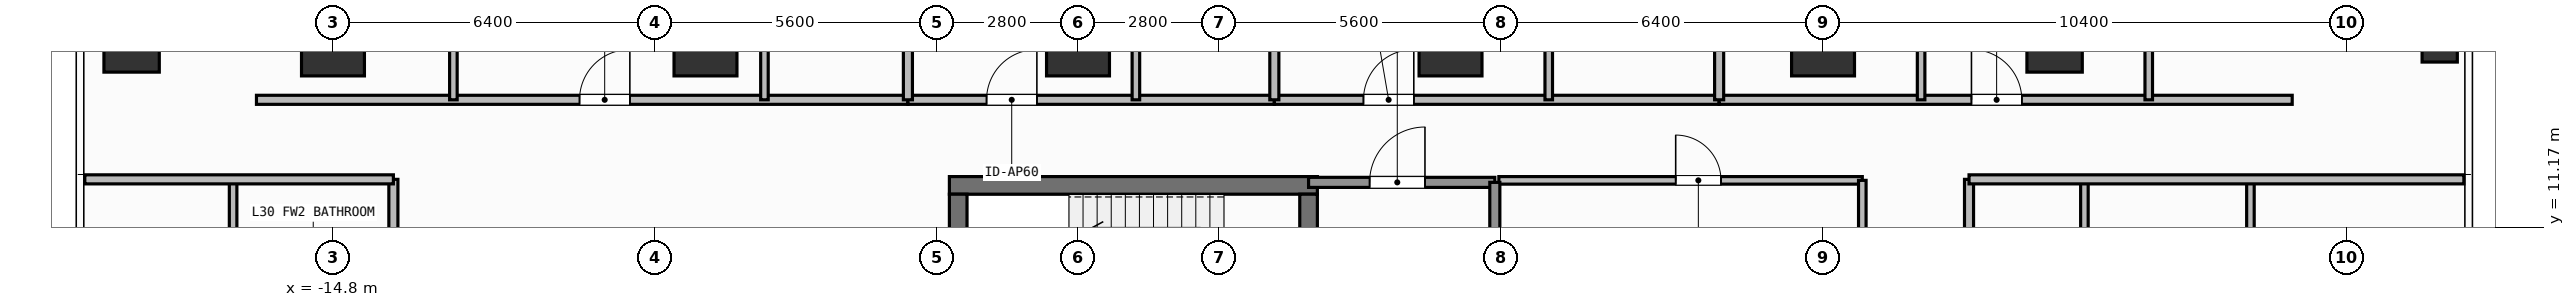
"""IFC4 building model, lengths in metres.
Left out: names, types, materials, properties, quantities, classifications, styles, units other than length and angle.
Written with IfcOpenShell. Run it as: python <this file> out.ifc"""

import sys

from ifc_helpers import new_model, si_unit, direction, frame, frame_2d, origin, origin_2d, place, context, subcontext, project, spatial, rectangle, hollow_rectangle, extrude, element, fill, save


model = new_model("IFC4")
c1 = context("Model", 3, precision=1e-05, world=origin(), true_north=direction((0.0, 1.0)))
c2 = subcontext(c1, "Body", "Model", "MODEL_VIEW")
j1 = project(units=[si_unit("LENGTHUNIT", "METRE"), si_unit("PLANEANGLEUNIT", "RADIAN")], contexts=[c1])
p1 = place(None, origin())
s1 = spatial("IfcSite", under=j1, at=p1, CompositionType="ELEMENT")
p2 = place(p1, origin())
s2 = spatial("IfcBuilding", under=s1, at=p2, CompositionType="ELEMENT")
p3 = place(p2, frame((0.0, 0.0, 121.2)))
s3 = spatial("IfcBuildingStorey", under=s2, at=p3, CompositionType="ELEMENT", Elevation=121.2)
p4 = place(p3, frame((-2.555, 12.0, 0.0), z_axis=(0.0, 0.0, 1.0), x_axis=(1.0, 0.0, 0.0)))
e1 = element("IfcWall", 1, at=p4, inside=s3, PredefinedType="SHEAR", context=c2, shape_type="SweptSolid", body=[
    extrude(rectangle(XDim=7.31, YDim=0.35, at=frame_2d((3.655, 0.0))), origin(), (0.0, 0.0, 1.0), 3.9),
])
p5 = place(p3, frame((-2.38, 8.9, 0.0), z_axis=(0.0, 0.0, 1.0), x_axis=(0.0, 1.0, 0.0)))
e2 = element("IfcWall", 2, at=p5, inside=s3, PredefinedType="SHEAR", context=c2, shape_type="SweptSolid", body=[
    extrude(rectangle(XDim=2.925, YDim=0.35, at=frame_2d((1.462, 0.0))), origin(), (0.0, 0.0, 1.0), 3.9),
])
p6 = place(p3, frame((4.58, 11.825, 0.0), z_axis=(0.0, 0.0, 1.0), x_axis=(0.0, -1.0, 0.0)))
e3 = element("IfcWall", 3, at=p6, inside=s3, PredefinedType="SHEAR", context=c2, shape_type="SweptSolid", body=[
    extrude(rectangle(XDim=2.925, YDim=0.35, at=frame_2d((1.462, 0.0))), origin(), (0.0, 0.0, 1.0), 3.9),
])
p7 = place(p6, frame((0.913, 0.0, 0.0)))
e4 = element("IfcOpeningElement", 4, at=p7, cuts=e3, PredefinedType="OPENING", context=c2, shape_type="SweptSolid", body=[
    extrude(rectangle(XDim=1.1, YDim=2.15, at=frame_2d((0.55, 1.075))), frame((0.0, 0.185, 0.0), z_axis=(0.0, -1.0, 0.0), x_axis=(1.0, 0.0, 0.0)), (0.0, 0.0, 1.0), 0.37),
])
for number, where, z_axis, x_axis in (
    (5, (-14.8, 14.8, 0.0), (0.0, 0.0, 1.0), (1.0, 0.0, 0.0)),
    (6, (-7.4, 14.8, 0.0), (0.0, 0.0, 1.0), (1.0, 0.0, 0.0)),
    (7, (0.0, 14.8, 0.0), (0.0, 0.0, 1.0), (1.0, 0.0, 0.0)),
    (8, (7.4, 14.8, 0.0), (0.0, 0.0, 1.0), (1.0, 0.0, 0.0)),
    (9, (14.8, 14.8, 0.0), (0.0, 0.0, 1.0), (1.0, 0.0, 0.0)),
):
    element("IfcColumn", number, at=place(p3, frame(where, z_axis=z_axis, x_axis=x_axis)), inside=s3, PredefinedType="COLUMN", context=c2, shape_type="SweptSolid", body=[
        extrude(rectangle(XDim=1.25, YDim=1.25, at=origin_2d()), origin(), (0.0, 0.0, 1.0), 3.9),
    ])
for number, where, z_axis, x_axis in (
    (10, (-18.8, 14.8, 0.0), (0.0, 0.0, 1.0), (1.0, 0.0, 0.0)),
    (11, (19.4, 14.8, 0.0), (0.0, 0.0, 1.0), (1.0, 0.0, 0.0)),
):
    element("IfcColumn", number, at=place(p3, frame(where, z_axis=z_axis, x_axis=x_axis)), inside=s3, PredefinedType="COLUMN", context=c2, shape_type="SweptSolid", body=[
        extrude(rectangle(XDim=1.1, YDim=1.1, at=origin_2d()), origin(), (0.0, 0.0, 1.0), 3.9),
    ])
p8 = place(p3, frame((27.05, 14.8, 0.0), z_axis=(0.0, 0.0, 1.0), x_axis=(1.0, 0.0, 0.0)))
e12 = element("IfcColumn", 12, at=p8, inside=s3, PredefinedType="COLUMN", context=c2, shape_type="SweptSolid", body=[
    extrude(hollow_rectangle(XDim=0.7, YDim=0.7, WallThickness=0.032, at=origin_2d()), origin(), (0.0, 0.0, 1.0), 3.9),
])
p9 = place(p3, frame((4.58, 12.06, 0.0), z_axis=(0.0, 0.0, 1.0), x_axis=(1.0, 0.0, 0.0)))
e13 = element("IfcWall", 13, at=p9, inside=s3, PredefinedType="SOLIDWALL", context=c2, shape_type="SweptSolid", body=[
    extrude(rectangle(XDim=3.7, YDim=0.2, at=frame_2d((1.85, 0.0))), origin(), (0.0, 0.0, 1.0), 3.68),
])
p10 = place(p9, frame((1.212, 0.0, 0.0)))
e14 = element("IfcOpeningElement", 14, at=p10, cuts=e13, PredefinedType="OPENING", context=c2, shape_type="SweptSolid", body=[
    extrude(rectangle(XDim=1.1, YDim=2.15, at=frame_2d((0.55, 1.075))), frame((0.0, 0.11, 0.0), z_axis=(0.0, -1.0, 0.0), x_axis=(1.0, 0.0, 0.0)), (0.0, 0.0, 1.0), 0.22),
])
p11 = place(p3, frame((8.36, 12.1, 0.0), z_axis=(0.0, 0.0, 1.0), x_axis=(1.0, 0.0, 0.0)))
e15 = element("IfcWall", 15, at=p11, inside=s3, PredefinedType="PARTITIONING", context=c2, shape_type="SweptSolid", body=[
    extrude(rectangle(XDim=7.22, YDim=0.15, at=frame_2d((3.61, 0.0))), origin(), (0.0, 0.0, 1.0), 3.68),
])
p12 = place(p11, frame((3.513, 0.0, 0.0)))
e16 = element("IfcOpeningElement", 16, at=p12, cuts=e15, PredefinedType="OPENING", context=c2, shape_type="SweptSolid", body=[
    extrude(rectangle(XDim=0.9, YDim=2.1, at=frame_2d((0.45, 1.05))), frame((0.0, 0.085, 0.0), z_axis=(0.0, -1.0, 0.0), x_axis=(1.0, 0.0, 0.0)), (0.0, 0.0, 1.0), 0.17),
])
p13 = place(p3, frame((-16.32, 13.7, 0.0), z_axis=(0.0, 0.0, 1.0), x_axis=(1.0, 0.0, 0.0)))
e17 = element("IfcWall", 17, at=p13, inside=s3, PredefinedType="PARTITIONING", context=c2, shape_type="SweptSolid", body=[
    extrude(rectangle(XDim=12.941, YDim=0.18, at=frame_2d((6.471, 0.0))), origin(), (0.0, 0.0, 1.0), 3.68),
])
p14 = place(p13, frame((6.417, 0.0, 0.0)))
e18 = element("IfcOpeningElement", 18, at=p14, cuts=e17, PredefinedType="OPENING", context=c2, shape_type="SweptSolid", body=[
    extrude(rectangle(XDim=1.0, YDim=2.2, at=frame_2d((0.5, 1.1))), frame((0.0, 0.1, 0.0), z_axis=(0.0, -1.0, 0.0), x_axis=(1.0, 0.0, 0.0)), (0.0, 0.0, 1.0), 0.2),
])
p15 = place(p3, frame((-12.408, 13.7, 0.0), z_axis=(0.0, 0.0, 1.0), x_axis=(0.0, 1.0, 0.0)))
e19 = element("IfcWall", 19, at=p15, inside=s3, PredefinedType="PARTITIONING", context=c2, shape_type="SweptSolid", body=[
    extrude(rectangle(XDim=6.664, YDim=0.15, at=frame_2d((3.332, 0.0))), origin(), (0.0, 0.0, 1.0), 3.68),
])
p16 = place(p15, frame((2.818, 0.0, 0.0)))
e20 = element("IfcOpeningElement", 20, at=p16, cuts=e19, PredefinedType="OPENING", context=c2, shape_type="SweptSolid", body=[
    extrude(rectangle(XDim=0.85, YDim=2.1, at=frame_2d((0.425, 1.05))), frame((0.0, 0.085, 0.0), z_axis=(0.0, -1.0, 0.0), x_axis=(1.0, 0.0, 0.0)), (0.0, 0.0, 1.0), 0.17),
])
p17 = place(p3, frame((-6.229, 13.7, 0.0), z_axis=(0.0, 0.0, 1.0), x_axis=(0.0, 1.0, 0.0)))
e21 = element("IfcWall", 21, at=p17, inside=s3, PredefinedType="PARTITIONING", context=c2, shape_type="SweptSolid", body=[
    extrude(rectangle(XDim=8.043, YDim=0.15, at=frame_2d((4.021, 0.0))), origin(), (0.0, 0.0, 1.0), 3.68),
])
p18 = place(p17, frame((3.685, 0.0, 0.0)))
e22 = element("IfcOpeningElement", 22, at=p18, cuts=e21, PredefinedType="OPENING", context=c2, shape_type="SweptSolid", body=[
    extrude(rectangle(XDim=0.85, YDim=2.1, at=frame_2d((0.425, 1.05))), frame((0.0, 0.085, 0.0), z_axis=(0.0, -1.0, 0.0), x_axis=(1.0, 0.0, 0.0)), (0.0, 0.0, 1.0), 0.17),
])
p19 = place(p3, frame((-3.379, 13.7, 0.0), z_axis=(0.0, 0.0, 1.0), x_axis=(1.0, 0.0, 0.0)))
e23 = element("IfcWall", 23, at=p19, inside=s3, PredefinedType="PARTITIONING", context=c2, shape_type="SweptSolid", body=[
    extrude(rectangle(XDim=7.279, YDim=0.18, at=frame_2d((3.639, 0.0))), origin(), (0.0, 0.0, 1.0), 3.68),
])
p20 = place(p19, frame((1.562, 0.0, 0.0)))
e24 = element("IfcOpeningElement", 24, at=p20, cuts=e23, PredefinedType="OPENING", context=c2, shape_type="SweptSolid", body=[
    extrude(rectangle(XDim=1.0, YDim=2.2, at=frame_2d((0.5, 1.1))), frame((0.0, 0.1, 0.0), z_axis=(0.0, -1.0, 0.0), x_axis=(1.0, 0.0, 0.0)), (0.0, 0.0, 1.0), 0.2),
])
p21 = place(p3, frame((1.15, 13.7, 0.0), z_axis=(0.0, 0.0, 1.0), x_axis=(0.0, 1.0, 0.0)))
e25 = element("IfcWall", 25, at=p21, inside=s3, PredefinedType="PARTITIONING", context=c2, shape_type="SweptSolid", body=[
    extrude(rectangle(XDim=6.32, YDim=0.15, at=frame_2d((3.16, 0.0))), origin(), (0.0, 0.0, 1.0), 3.68),
])
p22 = place(p21, frame((2.646, 0.0, 0.0)))
e26 = element("IfcOpeningElement", 26, at=p22, cuts=e25, PredefinedType="OPENING", context=c2, shape_type="SweptSolid", body=[
    extrude(rectangle(XDim=0.85, YDim=2.1, at=frame_2d((0.425, 1.05))), frame((0.0, 0.085, 0.0), z_axis=(0.0, -1.0, 0.0), x_axis=(1.0, 0.0, 0.0)), (0.0, 0.0, 1.0), 0.17),
])
p23 = place(p3, frame((3.9, 13.7, 0.0), z_axis=(0.0, 0.0, 1.0), x_axis=(1.0, 0.0, 0.0)))
e27 = element("IfcWall", 27, at=p23, inside=s3, PredefinedType="PARTITIONING", context=c2, shape_type="SweptSolid", body=[
    extrude(rectangle(XDim=8.836, YDim=0.18, at=frame_2d((4.418, 0.0))), origin(), (0.0, 0.0, 1.0), 3.68),
])
p24 = place(p23, frame((1.771, 0.0, 0.0)))
e28 = element("IfcOpeningElement", 28, at=p24, cuts=e27, PredefinedType="OPENING", context=c2, shape_type="SweptSolid", body=[
    extrude(rectangle(XDim=1.0, YDim=2.2, at=frame_2d((0.5, 1.1))), frame((0.0, 0.1, 0.0), z_axis=(0.0, -1.0, 0.0), x_axis=(1.0, 0.0, 0.0)), (0.0, 0.0, 1.0), 0.2),
])
p25 = place(p3, frame((9.351, 13.7, 0.0), z_axis=(0.0, 0.0, 1.0), x_axis=(0.0, 1.0, 0.0)))
e29 = element("IfcWall", 29, at=p25, inside=s3, PredefinedType="PARTITIONING", context=c2, shape_type="SweptSolid", body=[
    extrude(rectangle(XDim=6.32, YDim=0.15, at=frame_2d((3.16, 0.0))), origin(), (0.0, 0.0, 1.0), 3.68),
])
p26 = place(p25, frame((2.646, 0.0, 0.0)))
e30 = element("IfcOpeningElement", 30, at=p26, cuts=e29, PredefinedType="OPENING", context=c2, shape_type="SweptSolid", body=[
    extrude(rectangle(XDim=0.85, YDim=2.1, at=frame_2d((0.425, 1.05))), frame((0.0, 0.085, 0.0), z_axis=(0.0, -1.0, 0.0), x_axis=(1.0, 0.0, 0.0)), (0.0, 0.0, 1.0), 0.17),
])
p27 = place(p3, frame((12.736, 13.7, 0.0), z_axis=(0.0, 0.0, 1.0), x_axis=(1.0, 0.0, 0.0)))
e31 = element("IfcWall", 31, at=p27, inside=s3, PredefinedType="PARTITIONING", context=c2, shape_type="SweptSolid", body=[
    extrude(rectangle(XDim=11.384, YDim=0.18, at=frame_2d((5.692, 0.0))), origin(), (0.0, 0.0, 1.0), 3.68),
])
p28 = place(p27, frame((5.012, 0.0, 0.0)))
e32 = element("IfcOpeningElement", 32, at=p28, cuts=e31, PredefinedType="OPENING", context=c2, shape_type="SweptSolid", body=[
    extrude(rectangle(XDim=1.0, YDim=2.2, at=frame_2d((0.5, 1.1))), frame((0.0, 0.1, 0.0), z_axis=(0.0, -1.0, 0.0), x_axis=(1.0, 0.0, 0.0)), (0.0, 0.0, 1.0), 0.2),
])
p29 = place(p3, frame((16.748, 13.7, 0.0), z_axis=(0.0, 0.0, 1.0), x_axis=(0.0, 1.0, 0.0)))
e33 = element("IfcWall", 33, at=p29, inside=s3, PredefinedType="PARTITIONING", context=c2, shape_type="SweptSolid", body=[
    extrude(rectangle(XDim=4.3, YDim=0.15, at=frame_2d((2.15, 0.0))), origin(), (0.0, 0.0, 1.0), 3.68),
])
p30 = place(p29, frame((1.899, 0.0, 0.0)))
e34 = element("IfcOpeningElement", 34, at=p30, cuts=e33, PredefinedType="OPENING", context=c2, shape_type="SweptSolid", body=[
    extrude(rectangle(XDim=0.85, YDim=2.1, at=frame_2d((0.425, 1.05))), frame((0.0, 0.085, 0.0), z_axis=(0.0, -1.0, 0.0), x_axis=(1.0, 0.0, 0.0)), (0.0, 0.0, 1.0), 0.17),
])
p31 = place(p3, frame((21.27, 13.7, 0.0), z_axis=(0.0, 0.0, 1.0), x_axis=(0.0, 1.0, 0.0)))
e35 = element("IfcWall", 35, at=p31, inside=s3, PredefinedType="PARTITIONING", context=c2, shape_type="SweptSolid", body=[
    extrude(rectangle(XDim=8.043, YDim=0.15, at=frame_2d((4.021, 0.0))), origin(), (0.0, 0.0, 1.0), 3.68),
])
p32 = place(p31, frame((3.685, 0.0, 0.0)))
e36 = element("IfcOpeningElement", 36, at=p32, cuts=e35, PredefinedType="OPENING", context=c2, shape_type="SweptSolid", body=[
    extrude(rectangle(XDim=0.85, YDim=2.1, at=frame_2d((0.425, 1.05))), frame((0.0, 0.085, 0.0), z_axis=(0.0, -1.0, 0.0), x_axis=(1.0, 0.0, 0.0)), (0.0, 0.0, 1.0), 0.17),
])
p33 = place(p3, frame((-13.6, 1.018, 0.0), z_axis=(0.0, 0.0, 1.0), x_axis=(0.0, 1.0, 0.0)))
e37 = element("IfcWall", 37, at=p33, inside=s3, PredefinedType="PARTITIONING", context=c2, shape_type="SweptSolid", body=[
    extrude(rectangle(XDim=11.102, YDim=0.18, at=frame_2d((5.551, 0.0))), origin(), (0.0, 0.0, 1.0), 3.68),
])
p34 = place(p33, frame((4.606, 0.0, 0.0)))
e38 = element("IfcOpeningElement", 38, at=p34, cuts=e37, PredefinedType="OPENING", context=c2, shape_type="SweptSolid", body=[
    extrude(rectangle(XDim=1.0, YDim=2.2, at=frame_2d((0.5, 1.1))), frame((0.0, 0.1, 0.0), z_axis=(0.0, -1.0, 0.0), x_axis=(1.0, 0.0, 0.0)), (0.0, 0.0, 1.0), 0.2),
])
p35 = place(p3, frame((17.7, -12.12, 0.0), z_axis=(0.0, 0.0, 1.0), x_axis=(0.0, 1.0, 0.0)))
e39 = element("IfcWall", 39, at=p35, inside=s3, PredefinedType="PARTITIONING", context=c2, shape_type="SweptSolid", body=[
    extrude(rectangle(XDim=24.24, YDim=0.18, at=frame_2d((12.12, 0.0))), origin(), (0.0, 0.0, 1.0), 3.68),
])
p36 = place(p35, frame((11.62, 0.0, 0.0)))
e40 = element("IfcOpeningElement", 40, at=p36, cuts=e39, PredefinedType="OPENING", context=c2, shape_type="SweptSolid", body=[
    extrude(rectangle(XDim=1.0, YDim=2.2, at=frame_2d((0.5, 1.1))), frame((0.0, 0.1, 0.0), z_axis=(0.0, -1.0, 0.0), x_axis=(1.0, 0.0, 0.0)), (0.0, 0.0, 1.0), 0.2),
])
p37 = place(p3, frame((8.28, 8.875, 0.0), z_axis=(0.0, 0.0, 1.0), x_axis=(0.0, 1.0, 0.0)))
e41 = element("IfcWall", 41, at=p37, inside=s3, PredefinedType="SOLIDWALL", context=c2, shape_type="SweptSolid", body=[
    extrude(rectangle(XDim=3.185, YDim=0.2, at=frame_2d((1.593, 0.0))), origin(), (0.0, 0.0, 1.0), 3.68),
])
p38 = place(p3, frame((15.58, 5.85, 0.0), z_axis=(0.0, 0.0, 1.0), x_axis=(0.0, 1.0, 0.0)))
e42 = element("IfcWall", 42, at=p38, inside=s3, PredefinedType="PARTITIONING", context=c2, shape_type="SweptSolid", body=[
    extrude(rectangle(XDim=6.25, YDim=0.15, at=frame_2d((3.125, 0.0))), origin(), (0.0, 0.0, 1.0), 3.68),
])
for number, where, z_axis, x_axis in (
    (43, (-3.379, 13.7, 0.0), (0.0, 0.0, 1.0), (0.0, 1.0, 0.0)),
    (44, (3.9, 13.7, 0.0), (0.0, 0.0, 1.0), (0.0, 1.0, 0.0)),
    (45, (12.736, 13.7, 0.0), (0.0, 0.0, 1.0), (0.0, 1.0, 0.0)),
):
    element("IfcWall", number, at=place(p3, frame(where, z_axis=z_axis, x_axis=x_axis)), inside=s3, PredefinedType="PARTITIONING", context=c2, shape_type="SweptSolid", body=[
        extrude(rectangle(XDim=15.73, YDim=0.18, at=frame_2d((7.865, 0.0))), origin(), (0.0, 0.0, 1.0), 3.68),
    ])
p39 = place(p3, frame((-16.784, 8.394, 0.0), z_axis=(0.0, 0.0, 1.0), x_axis=(0.0, 1.0, 0.0)))
e46 = element("IfcWall", 46, at=p39, inside=s3, PredefinedType="PARTITIONING", context=c2, shape_type="SweptSolid", body=[
    extrude(rectangle(XDim=3.726, YDim=0.15, at=frame_2d((1.863, 0.0))), origin(), (0.0, 0.0, 1.0), 3.68),
])
p40 = place(p3, frame((-19.73, 12.12, 0.0), z_axis=(0.0, 0.0, 1.0), x_axis=(1.0, 0.0, 0.0)))
e47 = element("IfcWall", 47, at=p40, inside=s3, PredefinedType="PARTITIONING", context=c2, shape_type="SweptSolid", body=[
    extrude(rectangle(XDim=6.13, YDim=0.18, at=frame_2d((3.065, 0.0))), origin(), (0.0, 0.0, 1.0), 3.68),
])
for number, where, z_axis, x_axis in (
    (48, (19.992, 5.436, 0.0), (0.0, 0.0, 1.0), (0.0, 1.0, 0.0)),
    (49, (23.29, 5.436, 0.0), (0.0, 0.0, 1.0), (0.0, 1.0, 0.0)),
):
    element("IfcWall", number, at=place(p3, frame(where, z_axis=z_axis, x_axis=x_axis)), inside=s3, PredefinedType="PARTITIONING", context=c2, shape_type="SweptSolid", body=[
        extrude(rectangle(XDim=6.684, YDim=0.15, at=frame_2d((3.342, 0.0))), origin(), (0.0, 0.0, 1.0), 3.68),
    ])
p41 = place(p3, frame((17.7, 12.12, 0.0), z_axis=(0.0, 0.0, 1.0), x_axis=(1.0, 0.0, 0.0)))
e50 = element("IfcWall", 50, at=p41, inside=s3, PredefinedType="PARTITIONING", context=c2, shape_type="SweptSolid", body=[
    extrude(rectangle(XDim=9.83, YDim=0.18, at=frame_2d((4.915, 0.0))), origin(), (0.0, 0.0, 1.0), 3.68),
])
p42 = place(p10, origin())
e51 = element("IfcDoor", 51, at=p42, inside=s3, OperationType="SINGLE_SWING_RIGHT", PredefinedType="DOOR", context=c2, shape_type="SweptSolid", body=[
    extrude(rectangle(XDim=1.1, YDim=2.15, at=frame_2d((0.55, 1.075))), frame((0.0, 0.025, 0.0), z_axis=(0.0, -1.0, 0.0), x_axis=(1.0, 0.0, 0.0)), (0.0, 0.0, 1.0), 0.05),
])
fill(e14, e51)
p43 = place(p12, origin())
e52 = element("IfcDoor", 52, at=p43, inside=s3, OperationType="SINGLE_SWING_LEFT", PredefinedType="DOOR", context=c2, shape_type="SweptSolid", body=[
    extrude(rectangle(XDim=0.9, YDim=2.1, at=frame_2d((0.45, 1.05))), frame((0.0, 0.025, 0.0), z_axis=(0.0, -1.0, 0.0), x_axis=(1.0, 0.0, 0.0)), (0.0, 0.0, 1.0), 0.05),
])
fill(e16, e52)
p44 = place(p14, origin())
e53 = element("IfcDoor", 53, at=p44, inside=s3, OperationType="SINGLE_SWING_RIGHT", PredefinedType="DOOR", context=c2, shape_type="SweptSolid", body=[
    extrude(rectangle(XDim=1.0, YDim=2.2, at=frame_2d((0.5, 1.1))), frame((0.0, 0.025, 0.0), z_axis=(0.0, -1.0, 0.0), x_axis=(1.0, 0.0, 0.0)), (0.0, 0.0, 1.0), 0.05),
])
fill(e18, e53)
p45 = place(p20, origin())
e54 = element("IfcDoor", 54, at=p45, inside=s3, OperationType="SINGLE_SWING_RIGHT", PredefinedType="DOOR", context=c2, shape_type="SweptSolid", body=[
    extrude(rectangle(XDim=1.0, YDim=2.2, at=frame_2d((0.5, 1.1))), frame((0.0, 0.025, 0.0), z_axis=(0.0, -1.0, 0.0), x_axis=(1.0, 0.0, 0.0)), (0.0, 0.0, 1.0), 0.05),
])
fill(e24, e54)
p46 = place(p24, origin())
e55 = element("IfcDoor", 55, at=p46, inside=s3, OperationType="SINGLE_SWING_RIGHT", PredefinedType="DOOR", context=c2, shape_type="SweptSolid", body=[
    extrude(rectangle(XDim=1.0, YDim=2.2, at=frame_2d((0.5, 1.1))), frame((0.0, 0.025, 0.0), z_axis=(0.0, -1.0, 0.0), x_axis=(1.0, 0.0, 0.0)), (0.0, 0.0, 1.0), 0.05),
])
fill(e28, e55)
p47 = place(p28, origin())
e56 = element("IfcDoor", 56, at=p47, inside=s3, OperationType="SINGLE_SWING_LEFT", PredefinedType="DOOR", context=c2, shape_type="SweptSolid", body=[
    extrude(rectangle(XDim=1.0, YDim=2.2, at=frame_2d((0.5, 1.1))), frame((0.0, 0.025, 0.0), z_axis=(0.0, -1.0, 0.0), x_axis=(1.0, 0.0, 0.0)), (0.0, 0.0, 1.0), 0.05),
])
fill(e32, e56)
save(model, sys.argv[1])
